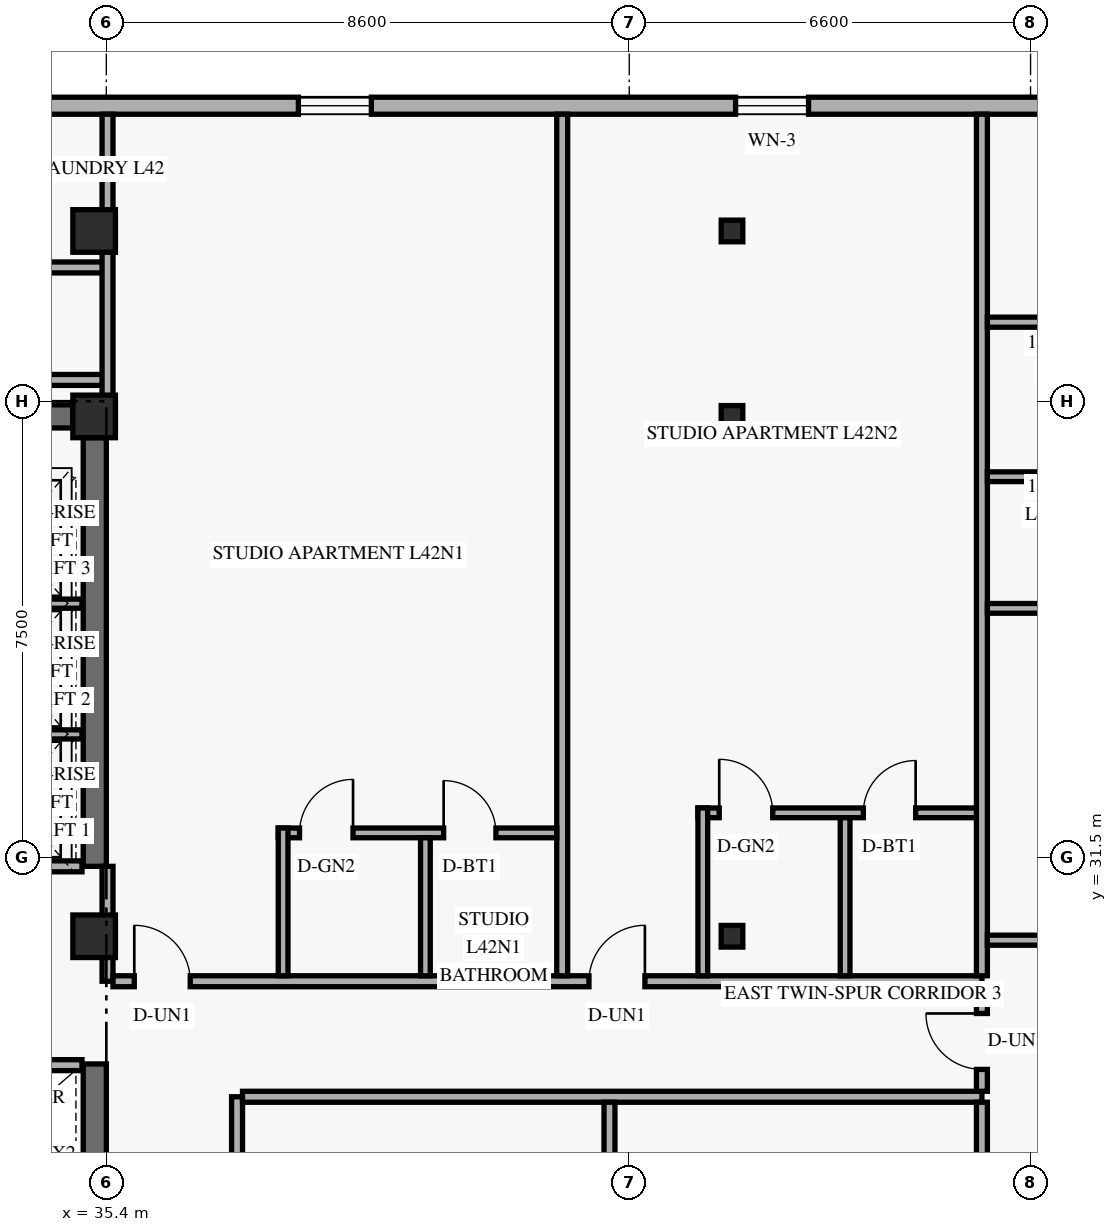
"""IFC4 building model, lengths in metres.
Left out: names, types, materials, properties, quantities, classifications, styles, units other than length and angle.
Written with IfcOpenShell. Run it as: python <this file> out.ifc"""

import sys

from ifc_helpers import new_model, si_unit, direction, frame, frame_2d, origin, origin_2d, place, context, subcontext, project, spatial, rectangle, hollow_rectangle, extrude, element, fill, save


model = new_model("IFC4")
c1 = context("Model", 3, precision=1e-05, world=origin(), true_north=direction((0.0, 1.0)))
c2 = subcontext(c1, "Body", "Model", "MODEL_VIEW")
j1 = project(units=[si_unit("LENGTHUNIT", "METRE"), si_unit("PLANEANGLEUNIT", "RADIAN")], contexts=[c1])
p1 = place(None, origin())
s1 = spatial("IfcSite", under=j1, at=p1, CompositionType="ELEMENT")
p2 = place(p1, origin())
s2 = spatial("IfcBuilding", under=s1, at=p2, CompositionType="ELEMENT")
p3 = place(p2, frame((0.0, 0.0, 162.6)))
s3 = spatial("IfcBuildingStorey", under=s2, at=p3, CompositionType="ELEMENT", Elevation=162.6)
p4 = place(p3, frame((35.21, 17.9, 0.0), z_axis=(0.0, 0.0, 1.0), x_axis=(0.0, 1.0, 0.0)))
e1 = element("IfcWall", 1, at=p4, inside=s3, PredefinedType="SHEAR", context=c2, shape_type="SweptSolid", body=[
    extrude(rectangle(XDim=10.2, YDim=0.38, at=frame_2d((5.1, 0.0))), origin(), (0.0, 0.0, 1.0), 2.748),
])
p5 = place(p3, frame((35.21, 31.35, 0.0), z_axis=(0.0, 0.0, 1.0), x_axis=(0.0, 1.0, 0.0)))
e2 = element("IfcWall", 2, at=p5, inside=s3, PredefinedType="SHEAR", context=c2, shape_type="SweptSolid", body=[
    extrude(rectangle(XDim=7.05, YDim=0.38, at=frame_2d((3.525, 0.0))), origin(), (0.0, 0.0, 1.0), 2.748),
])
p6 = place(p3, frame((24.55, 38.75, 0.0), z_axis=(0.0, 0.0, 1.0), x_axis=(1.0, 0.0, 0.0)))
e3 = element("IfcWall", 3, at=p6, inside=s3, PredefinedType="SHEAR", context=c2, shape_type="SweptSolid", body=[
    extrude(rectangle(XDim=10.3, YDim=0.38, at=frame_2d((5.15, 0.0))), origin(), (0.0, 0.0, 1.0), 3.36),
])
p7 = place(p6, frame((5.2, 0.0, 0.0)))
e4 = element("IfcOpeningElement", 4, at=p7, cuts=e3, PredefinedType="OPENING", context=c2, shape_type="SweptSolid", body=[
    extrude(rectangle(XDim=1.05, YDim=2.15, at=frame_2d((0.525, 1.075))), frame((0.0, 0.2, 0.0), z_axis=(0.0, -1.0, 0.0), x_axis=(1.0, 0.0, 0.0)), (0.0, 0.0, 1.0), 0.4),
])
for number, where, z_axis, x_axis in (
    (5, (35.2, 30.2, 0.0), (0.0, 0.0, 1.0), (1.0, 0.0, 0.0)),
    (6, (35.2, 38.75, 0.0), (0.0, 0.0, 1.0), (1.0, 0.0, 0.0)),
    (7, (35.2, 41.8, 0.0), (0.0, 0.0, 1.0), (1.0, 0.0, 0.0)),
):
    element("IfcColumn", number, at=place(p3, frame(where, z_axis=z_axis, x_axis=x_axis)), inside=s3, PredefinedType="COLUMN", context=c2, shape_type="SweptSolid", body=[
        extrude(rectangle(XDim=0.7, YDim=0.7, at=origin_2d()), origin(), (0.0, 0.0, 1.0), 3.6),
    ])
for number, where, z_axis, x_axis in (
    (8, (45.627, 30.2, 0.0), (0.035, 0.0, 0.999), (0.0, 1.0, 0.0)),
    (9, (45.627, 38.75, 0.0), (0.035, 0.0, 0.999), (0.0, 1.0, 0.0)),
    (10, (45.627, 41.8, 0.0), (0.035, 0.0, 0.999), (0.0, 1.0, 0.0)),
):
    element("IfcColumn", number, at=place(p3, frame(where, z_axis=z_axis, x_axis=x_axis)), inside=s3, PredefinedType="COLUMN", context=c2, shape_type="SweptSolid", body=[
        extrude(hollow_rectangle(XDim=0.356, YDim=0.356, WallThickness=0.016, at=origin_2d()), origin(), (0.0, 0.0, 1.0), 3.602),
    ])
p8 = place(p3, frame((54.98, 43.86, 0.0), z_axis=(0.0, 0.0, 1.0), x_axis=(-1.0, 0.0, 0.0)))
e11 = element("IfcWall", 11, at=p8, inside=s3, PredefinedType="SOLIDWALL", context=c2, shape_type="SweptSolid", body=[
    extrude(rectangle(XDim=33.76, YDim=0.28, at=frame_2d((16.88, 0.0))), origin(), (0.0, 0.0, 1.0), 3.36),
])
p9 = place(p8, frame((28.78, 0.0, 0.85)))
e12 = element("IfcOpeningElement", 12, at=p9, cuts=e11, PredefinedType="OPENING", context=c2, shape_type="SweptSolid", body=[
    extrude(rectangle(XDim=1.2, YDim=1.5, at=frame_2d((0.6, 0.75))), frame((0.0, 0.15, 0.0), z_axis=(0.0, -1.0, 0.0), x_axis=(1.0, 0.0, 0.0)), (0.0, 0.0, 1.0), 0.3),
])
p10 = place(p8, frame((21.895, 0.0, 0.85)))
e13 = element("IfcOpeningElement", 13, at=p10, cuts=e11, PredefinedType="OPENING", context=c2, shape_type="SweptSolid", body=[
    extrude(rectangle(XDim=1.2, YDim=1.5, at=frame_2d((0.6, 0.75))), frame((0.0, 0.15, 0.0), z_axis=(0.0, -1.0, 0.0), x_axis=(1.0, 0.0, 0.0)), (0.0, 0.0, 1.0), 0.3),
])
p11 = place(p8, frame((15.221, 0.0, 0.85)))
e14 = element("IfcOpeningElement", 14, at=p11, cuts=e11, PredefinedType="OPENING", context=c2, shape_type="SweptSolid", body=[
    extrude(rectangle(XDim=1.2, YDim=1.5, at=frame_2d((0.6, 0.75))), frame((0.0, 0.15, 0.0), z_axis=(0.0, -1.0, 0.0), x_axis=(1.0, 0.0, 0.0)), (0.0, 0.0, 1.0), 0.3),
])
p12 = place(p8, frame((8.031, 0.0, 0.85)))
e15 = element("IfcOpeningElement", 15, at=p12, cuts=e11, PredefinedType="OPENING", context=c2, shape_type="SweptSolid", body=[
    extrude(rectangle(XDim=1.2, YDim=1.5, at=frame_2d((0.6, 0.75))), frame((0.0, 0.15, 0.0), z_axis=(0.0, -1.0, 0.0), x_axis=(1.0, 0.0, 0.0)), (0.0, 0.0, 1.0), 0.3),
])
p13 = place(p8, frame((1.99, 0.0, 0.85)))
e16 = element("IfcOpeningElement", 16, at=p13, cuts=e11, PredefinedType="OPENING", context=c2, shape_type="SweptSolid", body=[
    extrude(rectangle(XDim=1.2, YDim=1.5, at=frame_2d((0.6, 0.75))), frame((0.0, 0.15, 0.0), z_axis=(0.0, -1.0, 0.0), x_axis=(1.0, 0.0, 0.0)), (0.0, 0.0, 1.0), 0.3),
])
for number, where, z_axis, x_axis in (
    (17, (32.74, 28.08, 0.0), (0.0, 0.0, 1.0), (1.0, 0.0, 0.0)),
    (18, (32.74, 31.35, 0.0), (0.0, 0.0, 1.0), (1.0, 0.0, 0.0)),
):
    element("IfcWall", number, at=place(p3, frame(where, z_axis=z_axis, x_axis=x_axis)), inside=s3, PredefinedType="STANDARD", context=c2, shape_type="SweptSolid", body=[
        extrude(rectangle(XDim=2.26, YDim=0.18, at=frame_2d((1.13, 0.0))), origin(), (0.0, 0.0, 1.0), 3.36),
    ])
for number, where, z_axis, x_axis in (
    (19, (32.74, 33.52, 0.0), (0.0, 0.0, 1.0), (1.0, 0.0, 0.0)),
    (20, (32.74, 35.67, 0.0), (0.0, 0.0, 1.0), (1.0, 0.0, 0.0)),
):
    element("IfcWall", number, at=place(p3, frame(where, z_axis=z_axis, x_axis=x_axis)), inside=s3, PredefinedType="STANDARD", context=c2, shape_type="SweptSolid", body=[
        extrude(rectangle(XDim=2.26, YDim=0.15, at=frame_2d((1.13, 0.0))), origin(), (0.0, 0.0, 1.0), 3.36),
    ])
p14 = place(p3, frame((37.55, 17.28, 0.0), z_axis=(0.0, 0.0, 1.0), x_axis=(0.0, 1.0, 0.0)))
e21 = element("IfcWall", 21, at=p14, inside=s3, PredefinedType="STANDARD", context=c2, shape_type="SweptSolid", body=[
    extrude(rectangle(XDim=10.28, YDim=0.18, at=frame_2d((5.14, 0.0))), origin(), (0.0, 0.0, 1.0), 2.73),
])
p15 = place(p14, frame((0.793, 0.0, 0.0)))
e22 = element("IfcOpeningElement", 22, at=p15, cuts=e21, PredefinedType="OPENING", context=c2, shape_type="SweptSolid", body=[
    extrude(rectangle(XDim=0.92, YDim=2.15, at=frame_2d((0.46, 1.075))), frame((0.0, 0.1, 0.0), z_axis=(0.0, -1.0, 0.0), x_axis=(1.0, 0.0, 0.0)), (0.0, 0.0, 1.0), 0.2),
])
p16 = place(p3, frame((37.64, 27.56, 0.0), z_axis=(0.0, 0.0, 1.0), x_axis=(1.0, 0.0, 0.0)))
e23 = element("IfcWall", 23, at=p16, inside=s3, PredefinedType="STANDARD", context=c2, shape_type="SweptSolid", body=[
    extrude(rectangle(XDim=12.16, YDim=0.18, at=frame_2d((6.08, 0.0))), origin(), (0.0, 0.0, 1.0), 2.73),
])
p17 = place(p3, frame((35.42, 29.46, 0.0), z_axis=(0.0, 0.0, 1.0), x_axis=(0.0, 1.0, 0.0)))
e24 = element("IfcWall", 24, at=p17, inside=s3, PredefinedType="STANDARD", context=c2, shape_type="SweptSolid", body=[
    extrude(rectangle(XDim=1.89, YDim=0.18, at=frame_2d((0.945, 0.0))), origin(), (0.0, 0.0, 1.0), 2.73),
])
p18 = place(p3, frame((35.51, 29.46, 0.0), z_axis=(0.0, 0.0, 1.0), x_axis=(1.0, 0.0, 0.0)))
e25 = element("IfcWall", 25, at=p18, inside=s3, PredefinedType="STANDARD", context=c2, shape_type="SweptSolid", body=[
    extrude(rectangle(XDim=14.29, YDim=0.18, at=frame_2d((7.145, 0.0))), origin(), (0.0, 0.0, 1.0), 2.73),
])
p19 = place(p18, frame((0.35, 0.0, 0.0)))
e26 = element("IfcOpeningElement", 26, at=p19, cuts=e25, PredefinedType="OPENING", context=c2, shape_type="SweptSolid", body=[
    extrude(rectangle(XDim=0.92, YDim=2.15, at=frame_2d((0.46, 1.075))), frame((0.0, 0.1, 0.0), z_axis=(0.0, -1.0, 0.0), x_axis=(1.0, 0.0, 0.0)), (0.0, 0.0, 1.0), 0.2),
])
p20 = place(p18, frame((7.828, 0.0, 0.0)))
e27 = element("IfcOpeningElement", 27, at=p20, cuts=e25, PredefinedType="OPENING", context=c2, shape_type="SweptSolid", body=[
    extrude(rectangle(XDim=0.92, YDim=2.15, at=frame_2d((0.46, 1.075))), frame((0.0, 0.1, 0.0), z_axis=(0.0, -1.0, 0.0), x_axis=(1.0, 0.0, 0.0)), (0.0, 0.0, 1.0), 0.2),
])
p21 = place(p3, frame((21.74, 41.2, 0.0), z_axis=(0.0, 0.0, 1.0), x_axis=(1.0, 0.0, 0.0)))
e28 = element("IfcWall", 28, at=p21, inside=s3, PredefinedType="STANDARD", context=c2, shape_type="SweptSolid", body=[
    extrude(rectangle(XDim=13.68, YDim=0.18, at=frame_2d((6.84, 0.0))), origin(), (0.0, 0.0, 1.0), 2.73),
])
p22 = place(p21, frame((2.95, 0.0, 0.0)))
e29 = element("IfcOpeningElement", 29, at=p22, cuts=e28, PredefinedType="OPENING", context=c2, shape_type="SweptSolid", body=[
    extrude(rectangle(XDim=0.95, YDim=2.15, at=frame_2d((0.475, 1.075))), frame((0.0, 0.1, 0.0), z_axis=(0.0, -1.0, 0.0), x_axis=(1.0, 0.0, 0.0)), (0.0, 0.0, 1.0), 0.2),
])
p23 = place(p21, frame((10.11, 0.0, 0.0)))
e30 = element("IfcOpeningElement", 30, at=p23, cuts=e28, PredefinedType="OPENING", context=c2, shape_type="SweptSolid", body=[
    extrude(rectangle(XDim=0.95, YDim=2.15, at=frame_2d((0.475, 1.075))), frame((0.0, 0.1, 0.0), z_axis=(0.0, -1.0, 0.0), x_axis=(1.0, 0.0, 0.0)), (0.0, 0.0, 1.0), 0.2),
])
p24 = place(p3, frame((23.85, 39.35, 0.0), z_axis=(0.0, 0.0, 1.0), x_axis=(1.0, 0.0, 0.0)))
e31 = element("IfcWall", 31, at=p24, inside=s3, PredefinedType="STANDARD", context=c2, shape_type="SweptSolid", body=[
    extrude(rectangle(XDim=11.57, YDim=0.18, at=frame_2d((5.785, 0.0))), origin(), (0.0, 0.0, 1.0), 2.73),
])
p25 = place(p3, frame((35.42, 38.75, 0.0), z_axis=(0.0, 0.0, 1.0), x_axis=(0.0, 1.0, 0.0)))
e32 = element("IfcWall", 32, at=p25, inside=s3, PredefinedType="PARTITIONING", context=c2, shape_type="SweptSolid", body=[
    extrude(rectangle(XDim=4.97, YDim=0.18, at=frame_2d((2.485, 0.0))), origin(), (0.0, 0.0, 1.0), 2.73),
])
p26 = place(p3, frame((42.898, 29.55, 0.0), z_axis=(0.0, 0.0, 1.0), x_axis=(0.0, 1.0, 0.0)))
e33 = element("IfcWall", 33, at=p26, inside=s3, PredefinedType="PARTITIONING", context=c2, shape_type="SweptSolid", body=[
    extrude(rectangle(XDim=14.17, YDim=0.18, at=frame_2d((7.085, 0.0))), origin(), (0.0, 0.0, 1.0), 2.73),
])
p27 = place(p3, frame((38.228, 31.9, 0.0), z_axis=(0.0, 0.0, 1.0), x_axis=(1.0, 0.0, 0.0)))
e34 = element("IfcWall", 34, at=p27, inside=s3, PredefinedType="PLUMBINGWALL", context=c2, shape_type="SweptSolid", body=[
    extrude(rectangle(XDim=4.58, YDim=0.16, at=frame_2d((2.29, 0.0))), origin(), (0.0, 0.0, 1.0), 3.36),
])
p28 = place(p27, frame((0.35, 0.0, 0.0)))
e35 = element("IfcOpeningElement", 35, at=p28, cuts=e34, PredefinedType="OPENING", context=c2, shape_type="SweptSolid", body=[
    extrude(rectangle(XDim=0.88, YDim=2.12, at=frame_2d((0.44, 1.06))), frame((0.0, 0.09, 0.0), z_axis=(0.0, -1.0, 0.0), x_axis=(1.0, 0.0, 0.0)), (0.0, 0.0, 1.0), 0.18),
])
p29 = place(p27, frame((2.72, 0.0, 0.0)))
e36 = element("IfcOpeningElement", 36, at=p29, cuts=e34, PredefinedType="OPENING", context=c2, shape_type="SweptSolid", body=[
    extrude(rectangle(XDim=0.86, YDim=2.12, at=frame_2d((0.43, 1.06))), frame((0.0, 0.09, 0.0), z_axis=(0.0, -1.0, 0.0), x_axis=(1.0, 0.0, 0.0)), (0.0, 0.0, 1.0), 0.18),
])
p30 = place(p3, frame((38.308, 29.55, 0.0), z_axis=(0.0, 0.0, 1.0), x_axis=(0.0, 1.0, 0.0)))
e37 = element("IfcWall", 37, at=p30, inside=s3, PredefinedType="PLUMBINGWALL", context=c2, shape_type="SweptSolid", body=[
    extrude(rectangle(XDim=2.43, YDim=0.16, at=frame_2d((1.215, 0.0))), origin(), (0.0, 0.0, 1.0), 2.73),
])
p31 = place(p3, frame((40.648, 29.55, 0.0), z_axis=(0.0, 0.0, 1.0), x_axis=(0.0, 1.0, 0.0)))
e38 = element("IfcWall", 38, at=p31, inside=s3, PredefinedType="PLUMBINGWALL", context=c2, shape_type="SweptSolid", body=[
    extrude(rectangle(XDim=2.27, YDim=0.16, at=frame_2d((1.135, 0.0))), origin(), (0.0, 0.0, 1.0), 2.73),
])
p32 = place(p3, frame((45.13, 32.23, 0.0), z_axis=(0.0, 0.0, 1.0), x_axis=(1.0, 0.0, 0.0)))
e39 = element("IfcWall", 39, at=p32, inside=s3, PredefinedType="PLUMBINGWALL", context=c2, shape_type="SweptSolid", body=[
    extrude(rectangle(XDim=4.67, YDim=0.16, at=frame_2d((2.335, 0.0))), origin(), (0.0, 0.0, 1.0), 2.73),
])
p33 = place(p32, frame((0.35, 0.0, 0.0)))
e40 = element("IfcOpeningElement", 40, at=p33, cuts=e39, PredefinedType="OPENING", context=c2, shape_type="SweptSolid", body=[
    extrude(rectangle(XDim=0.88, YDim=2.12, at=frame_2d((0.44, 1.06))), frame((0.0, 0.09, 0.0), z_axis=(0.0, -1.0, 0.0), x_axis=(1.0, 0.0, 0.0)), (0.0, 0.0, 1.0), 0.18),
])
p34 = place(p32, frame((2.72, 0.0, 0.0)))
e41 = element("IfcOpeningElement", 41, at=p34, cuts=e39, PredefinedType="OPENING", context=c2, shape_type="SweptSolid", body=[
    extrude(rectangle(XDim=0.86, YDim=2.12, at=frame_2d((0.43, 1.06))), frame((0.0, 0.09, 0.0), z_axis=(0.0, -1.0, 0.0), x_axis=(1.0, 0.0, 0.0)), (0.0, 0.0, 1.0), 0.18),
])
p35 = place(p3, frame((45.21, 29.55, 0.0), z_axis=(0.0, 0.0, 1.0), x_axis=(0.0, 1.0, 0.0)))
e42 = element("IfcWall", 42, at=p35, inside=s3, PredefinedType="PLUMBINGWALL", context=c2, shape_type="SweptSolid", body=[
    extrude(rectangle(XDim=2.76, YDim=0.16, at=frame_2d((1.38, 0.0))), origin(), (0.0, 0.0, 1.0), 2.73),
])
p36 = place(p3, frame((47.55, 29.55, 0.0), z_axis=(0.0, 0.0, 1.0), x_axis=(0.0, 1.0, 0.0)))
e43 = element("IfcWall", 43, at=p36, inside=s3, PredefinedType="PLUMBINGWALL", context=c2, shape_type="SweptSolid", body=[
    extrude(rectangle(XDim=2.6, YDim=0.16, at=frame_2d((1.3, 0.0))), origin(), (0.0, 0.0, 1.0), 2.73),
])
p37 = place(p3, frame((43.675, 17.37, 0.0), z_axis=(0.0, 0.0, 1.0), x_axis=(0.0, 1.0, 0.0)))
e44 = element("IfcWall", 44, at=p37, inside=s3, PredefinedType="PARTITIONING", context=c2, shape_type="SweptSolid", body=[
    extrude(rectangle(XDim=10.1, YDim=0.18, at=frame_2d((5.05, 0.0))), origin(), (0.0, 0.0, 1.0), 2.73),
])
p38 = place(p3, frame((49.8, 27.65, 0.0), z_axis=(0.0, 0.0, 1.0), x_axis=(0.0, 1.0, 0.0)))
e45 = element("IfcWall", 45, at=p38, inside=s3, PredefinedType="STANDARD", context=c2, shape_type="SweptSolid", body=[
    extrude(rectangle(XDim=1.72, YDim=0.18, at=frame_2d((0.86, 0.0))), origin(), (0.0, 0.0, 1.0), 3.36),
])
p39 = place(p38, frame((0.36, 0.0, 0.0)))
e46 = element("IfcOpeningElement", 46, at=p39, cuts=e45, PredefinedType="OPENING", context=c2, shape_type="SweptSolid", body=[
    extrude(rectangle(XDim=0.92, YDim=2.15, at=frame_2d((0.46, 1.075))), frame((0.0, 0.1, 0.0), z_axis=(0.0, -1.0, 0.0), x_axis=(1.0, 0.0, 0.0)), (0.0, 0.0, 1.0), 0.2),
])
p40 = place(p3, frame((49.8, 17.37, 0.0), z_axis=(0.0, 0.0, 1.0), x_axis=(0.0, 1.0, 0.0)))
e47 = element("IfcWall", 47, at=p40, inside=s3, PredefinedType="PARTITIONING", context=c2, shape_type="SweptSolid", body=[
    extrude(rectangle(XDim=10.1, YDim=0.18, at=frame_2d((5.05, 0.0))), origin(), (0.0, 0.0, 1.0), 2.73),
])
p41 = place(p3, frame((49.8, 29.55, 0.0), z_axis=(0.0, 0.0, 1.0), x_axis=(0.0, 1.0, 0.0)))
e48 = element("IfcWall", 48, at=p41, inside=s3, PredefinedType="PARTITIONING", context=c2, shape_type="SweptSolid", body=[
    extrude(rectangle(XDim=14.17, YDim=0.18, at=frame_2d((7.085, 0.0))), origin(), (0.0, 0.0, 1.0), 2.73),
])
p42 = place(p3, frame((49.89, 40.3, 0.0), z_axis=(0.0, 0.0, 1.0), x_axis=(1.0, 0.0, 0.0)))
e49 = element("IfcWall", 49, at=p42, inside=s3, PredefinedType="PARTITIONING", context=c2, shape_type="SweptSolid", body=[
    extrude(rectangle(XDim=8.43, YDim=0.165, at=frame_2d((4.215, 0.0))), origin(), (0.0, 0.0, 1.0), 2.879),
])
p43 = place(p42, frame((6.07, 0.0, 0.0)))
e50 = element("IfcOpeningElement", 50, at=p43, cuts=e49, PredefinedType="OPENING", context=c2, shape_type="SweptSolid", body=[
    extrude(rectangle(XDim=0.9, YDim=2.14, at=frame_2d((0.45, 1.07))), frame((0.0, 0.093, 0.0), z_axis=(0.0, -1.0, 0.0), x_axis=(1.0, 0.0, 0.0)), (0.0, 0.0, 1.0), 0.185),
])
p44 = place(p3, frame((49.89, 35.593, 0.0), z_axis=(0.0, 0.0, 1.0), x_axis=(1.0, 0.0, 0.0)))
e51 = element("IfcWall", 51, at=p44, inside=s3, PredefinedType="PLUMBINGWALL", context=c2, shape_type="SweptSolid", body=[
    extrude(rectangle(XDim=4.38, YDim=0.16, at=frame_2d((2.19, 0.0))), origin(), (0.0, 0.0, 1.0), 2.879),
])
p45 = place(p3, frame((49.89, 37.758, 0.0), z_axis=(0.0, 0.0, 1.0), x_axis=(1.0, 0.0, 0.0)))
e52 = element("IfcWall", 52, at=p45, inside=s3, PredefinedType="PLUMBINGWALL", context=c2, shape_type="SweptSolid", body=[
    extrude(rectangle(XDim=4.22, YDim=0.16, at=frame_2d((2.11, 0.0))), origin(), (0.0, 0.0, 1.0), 2.879),
])
p46 = place(p3, frame((49.89, 30.135, 0.0), z_axis=(0.0, 0.0, 1.0), x_axis=(1.0, 0.0, 0.0)))
e53 = element("IfcWall", 53, at=p46, inside=s3, PredefinedType="PARTITIONING", context=c2, shape_type="SweptSolid", body=[
    extrude(rectangle(XDim=8.43, YDim=0.165, at=frame_2d((4.215, 0.0))), origin(), (0.0, 0.0, 1.0), 2.73),
])
p47 = place(p46, frame((4.19, 0.0, 0.0)))
e54 = element("IfcOpeningElement", 54, at=p47, cuts=e53, PredefinedType="OPENING", context=c2, shape_type="SweptSolid", body=[
    extrude(rectangle(XDim=0.95, YDim=2.15, at=frame_2d((0.475, 1.075))), frame((0.0, 0.093, 0.0), z_axis=(0.0, -1.0, 0.0), x_axis=(1.0, 0.0, 0.0)), (0.0, 0.0, 1.0), 0.185),
])
p48 = place(p11, origin())
e55 = element("IfcWindow", 55, at=p48, inside=s3, PartitioningType="SINGLE_PANEL", PredefinedType="WINDOW", context=c2, shape_type="SweptSolid", body=[
    extrude(rectangle(XDim=1.2, YDim=1.5, at=frame_2d((0.6, 0.75))), frame((0.0, 0.03, 0.0), z_axis=(0.0, -1.0, 0.0), x_axis=(1.0, 0.0, 0.0)), (0.0, 0.0, 1.0), 0.06),
])
fill(e14, e55)
p49 = place(p12, origin())
e56 = element("IfcWindow", 56, at=p49, inside=s3, PartitioningType="SINGLE_PANEL", PredefinedType="WINDOW", context=c2, shape_type="SweptSolid", body=[
    extrude(rectangle(XDim=1.2, YDim=1.5, at=frame_2d((0.6, 0.75))), frame((0.0, 0.03, 0.0), z_axis=(0.0, -1.0, 0.0), x_axis=(1.0, 0.0, 0.0)), (0.0, 0.0, 1.0), 0.06),
])
fill(e15, e56)
p50 = place(p19, origin())
e57 = element("IfcDoor", 57, at=p50, inside=s3, OperationType="SINGLE_SWING_LEFT", PredefinedType="DOOR", context=c2, shape_type="SweptSolid", body=[
    extrude(rectangle(XDim=0.92, YDim=2.15, at=frame_2d((0.46, 1.075))), frame((0.0, 0.025, 0.0), z_axis=(0.0, -1.0, 0.0), x_axis=(1.0, 0.0, 0.0)), (0.0, 0.0, 1.0), 0.05),
])
fill(e26, e57)
p51 = place(p28, origin())
e58 = element("IfcDoor", 58, at=p51, inside=s3, OperationType="SINGLE_SWING_RIGHT", PredefinedType="DOOR", context=c2, shape_type="SweptSolid", body=[
    extrude(rectangle(XDim=0.88, YDim=2.12, at=frame_2d((0.44, 1.06))), frame((0.0, 0.025, 0.0), z_axis=(0.0, -1.0, 0.0), x_axis=(1.0, 0.0, 0.0)), (0.0, 0.0, 1.0), 0.05),
])
fill(e35, e58)
p52 = place(p29, origin())
e59 = element("IfcDoor", 59, at=p52, inside=s3, OperationType="SINGLE_SWING_LEFT", PredefinedType="DOOR", context=c2, shape_type="SweptSolid", body=[
    extrude(rectangle(XDim=0.86, YDim=2.12, at=frame_2d((0.43, 1.06))), frame((0.0, 0.025, 0.0), z_axis=(0.0, -1.0, 0.0), x_axis=(1.0, 0.0, 0.0)), (0.0, 0.0, 1.0), 0.05),
])
fill(e36, e59)
p53 = place(p20, origin())
e60 = element("IfcDoor", 60, at=p53, inside=s3, OperationType="SINGLE_SWING_RIGHT", PredefinedType="DOOR", context=c2, shape_type="SweptSolid", body=[
    extrude(rectangle(XDim=0.92, YDim=2.15, at=frame_2d((0.46, 1.075))), frame((0.0, 0.025, 0.0), z_axis=(0.0, -1.0, 0.0), x_axis=(1.0, 0.0, 0.0)), (0.0, 0.0, 1.0), 0.05),
])
fill(e27, e60)
p54 = place(p33, origin())
e61 = element("IfcDoor", 61, at=p54, inside=s3, OperationType="SINGLE_SWING_LEFT", PredefinedType="DOOR", context=c2, shape_type="SweptSolid", body=[
    extrude(rectangle(XDim=0.88, YDim=2.12, at=frame_2d((0.44, 1.06))), frame((0.0, 0.025, 0.0), z_axis=(0.0, -1.0, 0.0), x_axis=(1.0, 0.0, 0.0)), (0.0, 0.0, 1.0), 0.05),
])
fill(e40, e61)
p55 = place(p34, origin())
e62 = element("IfcDoor", 62, at=p55, inside=s3, OperationType="SINGLE_SWING_RIGHT", PredefinedType="DOOR", context=c2, shape_type="SweptSolid", body=[
    extrude(rectangle(XDim=0.86, YDim=2.12, at=frame_2d((0.43, 1.06))), frame((0.0, 0.025, 0.0), z_axis=(0.0, -1.0, 0.0), x_axis=(1.0, 0.0, 0.0)), (0.0, 0.0, 1.0), 0.05),
])
fill(e41, e62)
p56 = place(p39, origin())
e63 = element("IfcDoor", 63, at=p56, inside=s3, OperationType="SINGLE_SWING_RIGHT", PredefinedType="DOOR", context=c2, shape_type="SweptSolid", body=[
    extrude(rectangle(XDim=0.92, YDim=2.15, at=frame_2d((0.46, 1.075))), frame((0.0, 0.025, 0.0), z_axis=(0.0, -1.0, 0.0), x_axis=(1.0, 0.0, 0.0)), (0.0, 0.0, 1.0), 0.05),
])
fill(e46, e63)
save(model, sys.argv[1])
